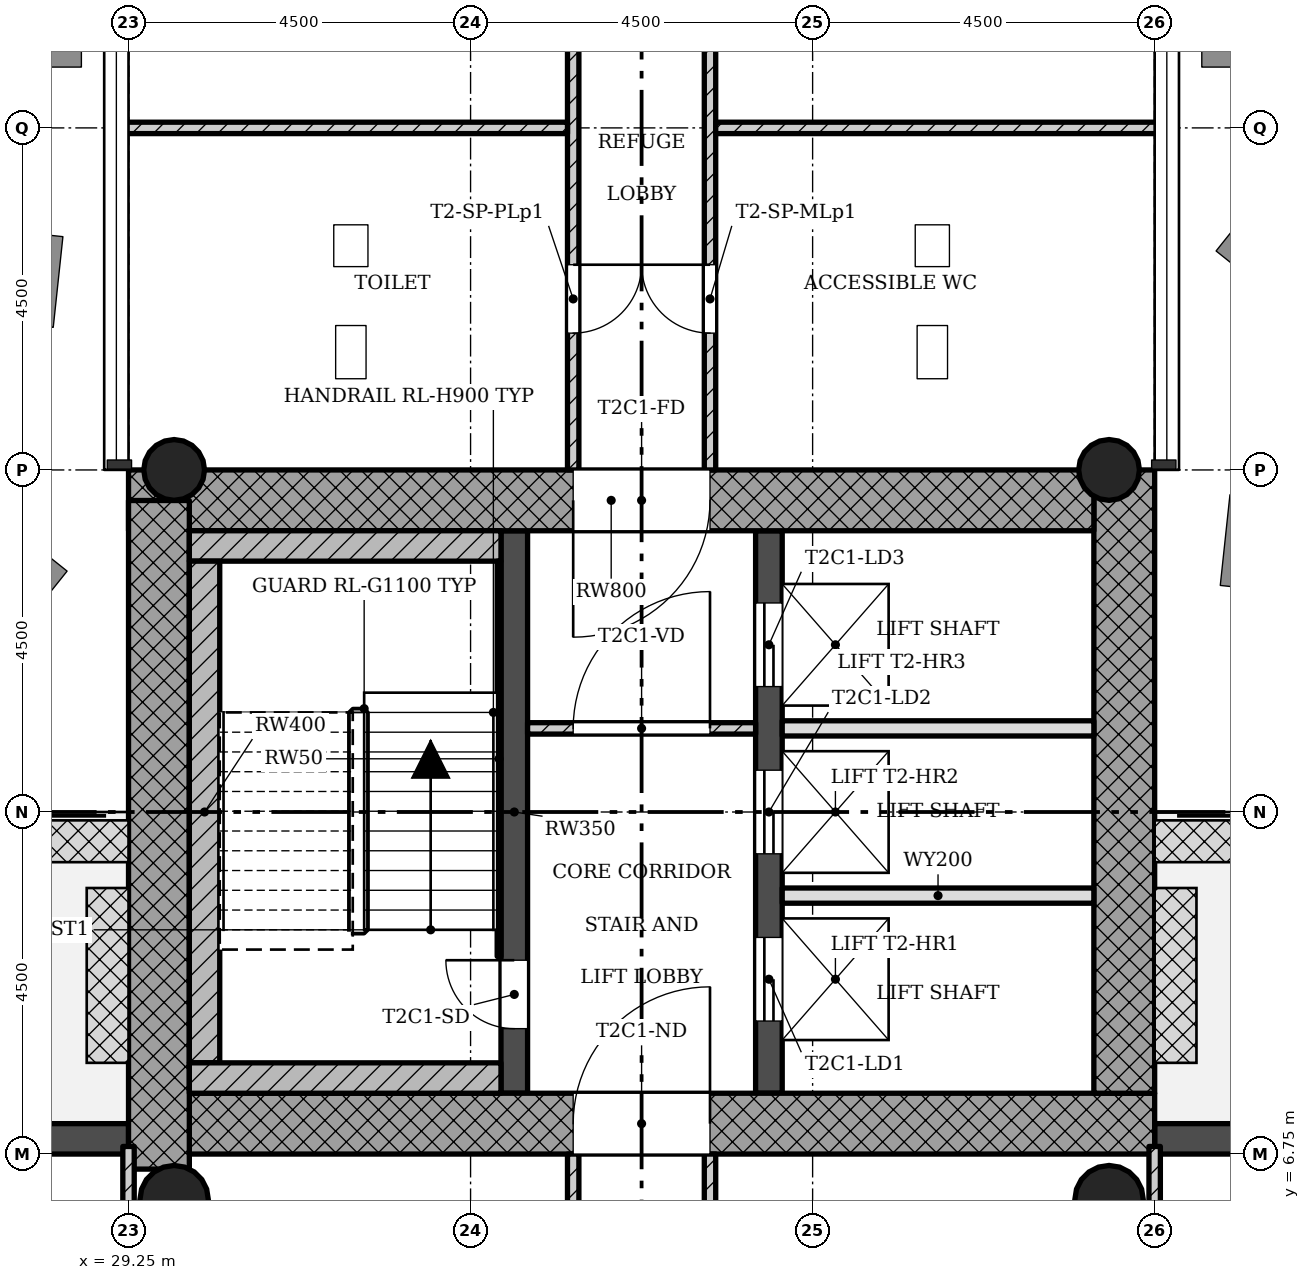
"""IFC4 building model, lengths in metres.
Left out: names, types, materials, properties, quantities, classifications, styles, units other than length and angle.
Written with IfcOpenShell. Run it as: python <this file> out.ifc"""

import sys

from ifc_helpers import new_model, si_unit, direction, frame, frame_2d, origin, origin_2d, place, context, subcontext, project, spatial, rectangle, hollow_circle, extrude, element, fill, save


model = new_model("IFC4")
c1 = context("Model", 3, precision=1e-05, world=origin(), true_north=direction((0.0, 1.0)))
c2 = subcontext(c1, "Body", "Model", "MODEL_VIEW")
j1 = project(units=[si_unit("LENGTHUNIT", "METRE"), si_unit("PLANEANGLEUNIT", "RADIAN")], contexts=[c1])
p1 = place(None, origin())
s1 = spatial("IfcSite", under=j1, at=p1, CompositionType="ELEMENT")
p2 = place(p1, origin())
s2 = spatial("IfcBuilding", under=s1, at=p2, CompositionType="ELEMENT")
p3 = place(p2, frame((0.0, 0.0, 181.3)))
s3 = spatial("IfcBuildingStorey", under=s2, at=p3, CompositionType="ELEMENT", Elevation=181.3)
p4 = place(p3, frame((30.05, 7.15, 0.0), z_axis=(0.0, 0.0, 1.0), x_axis=(1.0, 0.0, 0.0)))
e1 = element("IfcWall", 1, at=p4, inside=s3, PredefinedType="SHEAR", context=c2, shape_type="SweptSolid", body=[
    extrude(rectangle(XDim=12.7, YDim=0.8, at=frame_2d((6.35, 0.0))), origin(), (0.0, 0.0, 1.0), 4.5),
])
p5 = place(p4, frame((5.05, 0.0, 0.0)))
e2 = element("IfcOpeningElement", 2, at=p5, cuts=e1, PredefinedType="OPENING", context=c2, shape_type="SweptSolid", body=[
    extrude(rectangle(XDim=1.8, YDim=2.1, at=frame_2d((0.9, 1.05))), frame((0.0, 0.41, 0.0), z_axis=(0.0, -1.0, 0.0), x_axis=(1.0, 0.0, 0.0)), (0.0, 0.0, 1.0), 0.82),
])
p6 = place(p3, frame((42.35, 7.55, 0.0), z_axis=(0.0, 0.0, 1.0), x_axis=(0.0, 1.0, 0.0)))
e3 = element("IfcWall", 3, at=p6, inside=s3, PredefinedType="SHEAR", context=c2, shape_type="SweptSolid", body=[
    extrude(rectangle(XDim=8.2, YDim=0.8, at=frame_2d((4.1, 0.0))), origin(), (0.0, 0.0, 1.0), 4.5),
])
p7 = place(p3, frame((41.95, 15.35, 0.0), z_axis=(0.0, 0.0, 1.0), x_axis=(-1.0, 0.0, 0.0)))
e4 = element("IfcWall", 4, at=p7, inside=s3, PredefinedType="SHEAR", context=c2, shape_type="SweptSolid", body=[
    extrude(rectangle(XDim=12.7, YDim=0.8, at=frame_2d((6.35, 0.0))), origin(), (0.0, 0.0, 1.0), 4.5),
])
p8 = place(p7, frame((5.05, 0.0, 0.0)))
e5 = element("IfcOpeningElement", 5, at=p8, cuts=e4, PredefinedType="OPENING", context=c2, shape_type="SweptSolid", body=[
    extrude(rectangle(XDim=1.8, YDim=2.1, at=frame_2d((0.9, 1.05))), frame((0.0, 0.41, 0.0), z_axis=(0.0, -1.0, 0.0), x_axis=(1.0, 0.0, 0.0)), (0.0, 0.0, 1.0), 0.82),
])
p9 = place(p3, frame((29.65, 15.348, 0.0), z_axis=(0.0, 0.0, 1.0), x_axis=(0.0, -1.0, 0.0)))
e6 = element("IfcWall", 6, at=p9, inside=s3, PredefinedType="SHEAR", context=c2, shape_type="SweptSolid", body=[
    extrude(rectangle(XDim=8.796, YDim=0.8, at=frame_2d((4.398, 0.0))), origin(), (0.0, 0.0, 1.0), 4.5),
])
p10 = place(p3, frame((34.325, 7.55, 0.0), z_axis=(0.0, 0.0, 1.0), x_axis=(0.0, 1.0, 0.0)))
e7 = element("IfcWall", 7, at=p10, inside=s3, PredefinedType="SHEAR", context=c2, shape_type="SweptSolid", body=[
    extrude(rectangle(XDim=7.4, YDim=0.35, at=frame_2d((3.7, 0.0))), origin(), (0.0, 0.0, 1.0), 4.5),
])
p11 = place(p10, frame((0.85, 0.0, 0.0)))
e8 = element("IfcOpeningElement", 8, at=p11, cuts=e7, PredefinedType="OPENING", context=c2, shape_type="SweptSolid", body=[
    extrude(rectangle(XDim=0.9, YDim=2.1, at=frame_2d((0.45, 1.05))), frame((0.0, 0.185, 0.0), z_axis=(0.0, -1.0, 0.0), x_axis=(1.0, 0.0, 0.0)), (0.0, 0.0, 1.0), 0.37),
])
p12 = place(p3, frame((37.675, 7.55, 0.0), z_axis=(0.0, 0.0, 1.0), x_axis=(0.0, 1.0, 0.0)))
e9 = element("IfcWall", 9, at=p12, inside=s3, PredefinedType="SHEAR", context=c2, shape_type="SweptSolid", body=[
    extrude(rectangle(XDim=7.4, YDim=0.35, at=frame_2d((3.7, 0.0))), origin(), (0.0, 0.0, 1.0), 4.5),
])
p13 = place(p12, frame((0.95, 0.0, 0.0)))
e10 = element("IfcOpeningElement", 10, at=p13, cuts=e9, PredefinedType="OPENING", context=c2, shape_type="SweptSolid", body=[
    extrude(rectangle(XDim=1.1, YDim=2.1, at=frame_2d((0.55, 1.05))), frame((0.0, 0.185, 0.0), z_axis=(0.0, -1.0, 0.0), x_axis=(1.0, 0.0, 0.0)), (0.0, 0.0, 1.0), 0.37),
])
p14 = place(p12, frame((3.15, 0.0, 0.0)))
e11 = element("IfcOpeningElement", 11, at=p14, cuts=e9, PredefinedType="OPENING", context=c2, shape_type="SweptSolid", body=[
    extrude(rectangle(XDim=1.1, YDim=2.1, at=frame_2d((0.55, 1.05))), frame((0.0, 0.185, 0.0), z_axis=(0.0, -1.0, 0.0), x_axis=(1.0, 0.0, 0.0)), (0.0, 0.0, 1.0), 0.37),
])
p15 = place(p12, frame((5.35, 0.0, 0.0)))
e12 = element("IfcOpeningElement", 12, at=p15, cuts=e9, PredefinedType="OPENING", context=c2, shape_type="SweptSolid", body=[
    extrude(rectangle(XDim=1.1, YDim=2.1, at=frame_2d((0.55, 1.05))), frame((0.0, 0.185, 0.0), z_axis=(0.0, -1.0, 0.0), x_axis=(1.0, 0.0, 0.0)), (0.0, 0.0, 1.0), 0.37),
])
for number, where, z_axis, x_axis in (
    (13, (42.15, 15.75, 0.0), (0.0, 0.0, 1.0), (1.0, 0.0, 0.0)),
    (14, (29.85, 15.75, 0.0), (0.0, 0.0, 1.0), (1.0, 0.0, 0.0)),
):
    element("IfcColumn", number, at=place(p3, frame(where, z_axis=z_axis, x_axis=x_axis)), inside=s3, PredefinedType="COLUMN", context=c2, shape_type="SweptSolid", body=[
        extrude(hollow_circle(Radius=0.4, WallThickness=0.028, at=origin_2d()), origin(), (0.0, 0.0, 1.0), 4.5),
    ])
for number, where, z_axis, x_axis in (
    (15, (42.15, 6.15, 0.0), (0.0, 0.0, 1.0), (1.0, 0.0, 0.0)),
    (16, (29.85, 6.15, 0.0), (0.0, 0.0, 1.0), (1.0, 0.0, 0.0)),
):
    element("IfcColumn", number, at=place(p3, frame(where, z_axis=z_axis, x_axis=x_axis)), inside=s3, PredefinedType="COLUMN", context=c2, shape_type="SweptSolid", body=[
        extrude(hollow_circle(Radius=0.45, WallThickness=0.032, at=origin_2d()), origin(), (0.0, 0.0, 1.0), 4.5),
    ])
p16 = place(p3, frame((47.25, 6.95, -0.02), z_axis=(0.0, 0.0, 1.0), x_axis=(-1.0, 0.0, 0.0)))
e17 = element("IfcWall", 17, at=p16, inside=s3, PredefinedType="STANDARD", context=c2, shape_type="SweptSolid", body=[
    extrude(rectangle(XDim=4.5, YDim=0.4, at=frame_2d((2.25, 0.0))), origin(), (0.0, 0.0, 1.0), 4.22),
])
p17 = place(p16, frame((1.35, 0.0, 0.02)))
e18 = element("IfcOpeningElement", 18, at=p17, cuts=e17, PredefinedType="OPENING", context=c2, shape_type="SweptSolid", body=[
    extrude(rectangle(XDim=1.8, YDim=2.1, at=frame_2d((0.9, 1.05))), frame((0.0, 0.21, 0.0), z_axis=(0.0, -1.0, 0.0), x_axis=(1.0, 0.0, 0.0)), (0.0, 0.0, 1.0), 0.42),
])
p18 = place(p3, frame((29.25, 6.95, -0.02), z_axis=(0.0, 0.0, 1.0), x_axis=(-1.0, 0.0, 0.0)))
e19 = element("IfcWall", 19, at=p18, inside=s3, PredefinedType="STANDARD", context=c2, shape_type="SweptSolid", body=[
    extrude(rectangle(XDim=4.5, YDim=0.4, at=frame_2d((2.25, 0.0))), origin(), (0.0, 0.0, 1.0), 4.22),
])
p19 = place(p18, frame((1.35, 0.0, 0.02)))
e20 = element("IfcOpeningElement", 20, at=p19, cuts=e19, PredefinedType="OPENING", context=c2, shape_type="SweptSolid", body=[
    extrude(rectangle(XDim=1.8, YDim=2.1, at=frame_2d((0.9, 1.05))), frame((0.0, 0.21, 0.0), z_axis=(0.0, -1.0, 0.0), x_axis=(1.0, 0.0, 0.0)), (0.0, 0.0, 1.0), 0.42),
])
p20 = place(p3, frame((37.5, 12.35, 0.0), z_axis=(0.0, 0.0, 1.0), x_axis=(-1.0, 0.0, 0.0)))
e21 = element("IfcWall", 21, at=p20, inside=s3, PredefinedType="PARTITIONING", context=c2, shape_type="SweptSolid", body=[
    extrude(rectangle(XDim=3.0, YDim=0.15, at=frame_2d((1.5, 0.0))), origin(), (0.0, 0.0, 1.0), 4.08),
])
p21 = place(p20, frame((0.6, 0.0, 0.0)))
e22 = element("IfcOpeningElement", 22, at=p21, cuts=e21, PredefinedType="OPENING", context=c2, shape_type="SweptSolid", body=[
    extrude(rectangle(XDim=1.8, YDim=2.1, at=frame_2d((0.9, 1.05))), frame((0.0, 0.085, 0.0), z_axis=(0.0, -1.0, 0.0), x_axis=(1.0, 0.0, 0.0)), (0.0, 0.0, 1.0), 0.17),
])
for number, where, z_axis, x_axis in (
    (23, (41.95, 10.15, 0.0), (0.0, 0.0, 1.0), (-1.0, 0.0, 0.0)),
    (24, (41.95, 12.35, 0.0), (0.0, 0.0, 1.0), (-1.0, 0.0, 0.0)),
):
    element("IfcWall", number, at=place(p3, frame(where, z_axis=z_axis, x_axis=x_axis)), inside=s3, PredefinedType="SOLIDWALL", context=c2, shape_type="SweptSolid", body=[
        extrude(rectangle(XDim=4.1, YDim=0.2, at=frame_2d((2.05, 0.0))), origin(), (0.0, 0.0, 1.0), 4.08),
    ])
p22 = place(p3, frame((35.1, 0.9, 0.0), z_axis=(0.0, 0.0, 1.0), x_axis=(0.0, 1.0, 0.0)))
e25 = element("IfcWall", 25, at=p22, inside=s3, PredefinedType="PARTITIONING", context=c2, shape_type="SweptSolid", body=[
    extrude(rectangle(XDim=5.85, YDim=0.15, at=frame_2d((2.925, 0.0))), origin(), (0.0, 0.0, 1.0), 4.08),
])
p23 = place(p22, frame((2.475, 0.0, 0.0)))
e26 = element("IfcOpeningElement", 26, at=p23, cuts=e25, PredefinedType="OPENING", context=c2, shape_type="SweptSolid", body=[
    extrude(rectangle(XDim=0.9, YDim=2.1, at=frame_2d((0.45, 1.05))), frame((0.0, 0.085, 0.0), z_axis=(0.0, -1.0, 0.0), x_axis=(1.0, 0.0, 0.0)), (0.0, 0.0, 1.0), 0.17),
])
p24 = place(p3, frame((36.9, 0.9, 0.0), z_axis=(0.0, 0.0, 1.0), x_axis=(0.0, 1.0, 0.0)))
e27 = element("IfcWall", 27, at=p24, inside=s3, PredefinedType="PARTITIONING", context=c2, shape_type="SweptSolid", body=[
    extrude(rectangle(XDim=5.85, YDim=0.15, at=frame_2d((2.925, 0.0))), origin(), (0.0, 0.0, 1.0), 4.08),
])
p25 = place(p24, frame((2.475, 0.0, 0.0)))
e28 = element("IfcOpeningElement", 28, at=p25, cuts=e27, PredefinedType="OPENING", context=c2, shape_type="SweptSolid", body=[
    extrude(rectangle(XDim=0.9, YDim=2.1, at=frame_2d((0.45, 1.05))), frame((0.0, 0.085, 0.0), z_axis=(0.0, -1.0, 0.0), x_axis=(1.0, 0.0, 0.0)), (0.0, 0.0, 1.0), 0.17),
])
p26 = place(p3, frame((35.1, 15.75, 0.0), z_axis=(0.0, 0.0, 1.0), x_axis=(0.0, 1.0, 0.0)))
e29 = element("IfcWall", 29, at=p26, inside=s3, PredefinedType="PARTITIONING", context=c2, shape_type="SweptSolid", body=[
    extrude(rectangle(XDim=9.1, YDim=0.15, at=frame_2d((4.55, 0.0))), origin(), (0.0, 0.0, 1.0), 4.08),
])
p27 = place(p26, frame((1.8, 0.0, 0.0)))
e30 = element("IfcOpeningElement", 30, at=p27, cuts=e29, PredefinedType="OPENING", context=c2, shape_type="SweptSolid", body=[
    extrude(rectangle(XDim=0.9, YDim=2.1, at=frame_2d((0.45, 1.05))), frame((0.0, 0.085, 0.0), z_axis=(0.0, -1.0, 0.0), x_axis=(1.0, 0.0, 0.0)), (0.0, 0.0, 1.0), 0.17),
])
p28 = place(p26, frame((6.3, 0.0, 0.0)))
e31 = element("IfcOpeningElement", 31, at=p28, cuts=e29, PredefinedType="OPENING", context=c2, shape_type="SweptSolid", body=[
    extrude(rectangle(XDim=0.9, YDim=2.1, at=frame_2d((0.45, 1.05))), frame((0.0, 0.085, 0.0), z_axis=(0.0, -1.0, 0.0), x_axis=(1.0, 0.0, 0.0)), (0.0, 0.0, 1.0), 0.17),
])
p29 = place(p3, frame((35.025, 20.25, 0.0), z_axis=(0.0, 0.0, 1.0), x_axis=(-1.0, 0.0, 0.0)))
e32 = element("IfcWall", 32, at=p29, inside=s3, PredefinedType="PARTITIONING", context=c2, shape_type="SweptSolid", body=[
    extrude(rectangle(XDim=5.875, YDim=0.15, at=frame_2d((2.938, 0.0))), origin(), (0.0, 0.0, 1.0), 4.08),
])
p30 = place(p3, frame((36.9, 15.75, 0.0), z_axis=(0.0, 0.0, 1.0), x_axis=(0.0, 1.0, 0.0)))
e33 = element("IfcWall", 33, at=p30, inside=s3, PredefinedType="PARTITIONING", context=c2, shape_type="SweptSolid", body=[
    extrude(rectangle(XDim=9.1, YDim=0.15, at=frame_2d((4.55, 0.0))), origin(), (0.0, 0.0, 1.0), 4.08),
])
p31 = place(p30, frame((1.8, 0.0, 0.0)))
e34 = element("IfcOpeningElement", 34, at=p31, cuts=e33, PredefinedType="OPENING", context=c2, shape_type="SweptSolid", body=[
    extrude(rectangle(XDim=0.9, YDim=2.1, at=frame_2d((0.45, 1.05))), frame((0.0, 0.085, 0.0), z_axis=(0.0, -1.0, 0.0), x_axis=(1.0, 0.0, 0.0)), (0.0, 0.0, 1.0), 0.17),
])
p32 = place(p30, frame((6.3, 0.0, 0.0)))
e35 = element("IfcOpeningElement", 35, at=p32, cuts=e33, PredefinedType="OPENING", context=c2, shape_type="SweptSolid", body=[
    extrude(rectangle(XDim=0.9, YDim=2.1, at=frame_2d((0.45, 1.05))), frame((0.0, 0.085, 0.0), z_axis=(0.0, -1.0, 0.0), x_axis=(1.0, 0.0, 0.0)), (0.0, 0.0, 1.0), 0.17),
])
p33 = place(p3, frame((36.975, 20.25, 0.0), z_axis=(0.0, 0.0, 1.0), x_axis=(1.0, 0.0, 0.0)))
e36 = element("IfcWall", 36, at=p33, inside=s3, PredefinedType="PARTITIONING", context=c2, shape_type="SweptSolid", body=[
    extrude(rectangle(XDim=5.875, YDim=0.15, at=frame_2d((2.938, 0.0))), origin(), (0.0, 0.0, 1.0), 4.08),
])
p34 = place(p3, frame((29.25, -6.85, 0.0), z_axis=(0.0, 0.0, 1.0), x_axis=(0.0, 1.0, 0.0)))
e37 = element("IfcWall", 37, at=p34, inside=s3, PredefinedType="PARTITIONING", context=c2, shape_type="SweptSolid", body=[
    extrude(rectangle(XDim=13.7, YDim=0.15, at=frame_2d((6.85, 0.0))), origin(), (0.0, 0.0, 1.0), 4.08),
])
p35 = place(p34, frame((5.95, 0.0, 0.0)))
e38 = element("IfcOpeningElement", 38, at=p35, cuts=e37, PredefinedType="OPENING", context=c2, shape_type="SweptSolid", body=[
    extrude(rectangle(XDim=1.8, YDim=2.1, at=frame_2d((0.9, 1.05))), frame((0.0, 0.085, 0.0), z_axis=(0.0, -1.0, 0.0), x_axis=(1.0, 0.0, 0.0)), (0.0, 0.0, 1.0), 0.17),
])
p36 = place(p3, frame((42.75, -6.85, 0.0), z_axis=(0.0, 0.0, 1.0), x_axis=(0.0, 1.0, 0.0)))
e39 = element("IfcWall", 39, at=p36, inside=s3, PredefinedType="PARTITIONING", context=c2, shape_type="SweptSolid", body=[
    extrude(rectangle(XDim=13.7, YDim=0.15, at=frame_2d((6.85, 0.0))), origin(), (0.0, 0.0, 1.0), 4.08),
])
p37 = place(p36, frame((5.95, 0.0, 0.0)))
e40 = element("IfcOpeningElement", 40, at=p37, cuts=e39, PredefinedType="OPENING", context=c2, shape_type="SweptSolid", body=[
    extrude(rectangle(XDim=1.8, YDim=2.1, at=frame_2d((0.9, 1.05))), frame((0.0, 0.085, 0.0), z_axis=(0.0, -1.0, 0.0), x_axis=(1.0, 0.0, 0.0)), (0.0, 0.0, 1.0), 0.17),
])
p38 = place(p3, frame((34.15, 14.75, 0.0), z_axis=(0.0, 0.0, 1.0), x_axis=(-1.0, 0.0, 0.0)))
e41 = element("IfcWall", 41, at=p38, inside=s3, PredefinedType="SHEAR", context=c2, shape_type="SweptSolid", body=[
    extrude(rectangle(XDim=4.1, YDim=0.4, at=frame_2d((2.05, 0.0))), origin(), (0.0, 0.0, 1.0), 4.5),
])
p39 = place(p3, frame((30.25, 7.95, 0.0), z_axis=(0.0, 0.0, 1.0), x_axis=(0.0, 1.0, 0.0)))
e42 = element("IfcWall", 42, at=p39, inside=s3, PredefinedType="SHEAR", context=c2, shape_type="SweptSolid", body=[
    extrude(rectangle(XDim=6.6, YDim=0.4, at=frame_2d((3.3, 0.0))), origin(), (0.0, 0.0, 1.0), 4.5),
])
p40 = place(p3, frame((34.15, 7.75, 0.0), z_axis=(0.0, 0.0, 1.0), x_axis=(-1.0, 0.0, 0.0)))
e43 = element("IfcWall", 43, at=p40, inside=s3, PredefinedType="SHEAR", context=c2, shape_type="SweptSolid", body=[
    extrude(rectangle(XDim=4.1, YDim=0.4, at=frame_2d((2.05, 0.0))), origin(), (0.0, 0.0, 1.0), 4.5),
])
p41 = place(p3, frame((34.125, 9.35, 0.0), z_axis=(0.0, 0.0, 1.0), x_axis=(0.0, 1.0, 0.0)))
e44 = element("IfcWall", 44, at=p41, inside=s3, PredefinedType="SHEAR", context=c2, shape_type="SweptSolid", body=[
    extrude(rectangle(XDim=5.2, YDim=0.05, at=frame_2d((2.6, 0.0))), origin(), (0.0, 0.0, 1.0), 4.5),
])
p42 = place(p21, origin())
e45 = element("IfcDoor", 45, at=p42, inside=s3, OperationType="SINGLE_SWING_LEFT", PredefinedType="DOOR", context=c2, shape_type="SweptSolid", body=[
    extrude(rectangle(XDim=1.8, YDim=2.1, at=frame_2d((0.9, 1.05))), frame((0.0, 0.025, 0.0), z_axis=(0.0, -1.0, 0.0), x_axis=(1.0, 0.0, 0.0)), (0.0, 0.0, 1.0), 0.05),
])
fill(e22, e45)
p43 = place(p27, origin())
e46 = element("IfcDoor", 46, at=p43, inside=s3, OperationType="SINGLE_SWING_RIGHT", PredefinedType="DOOR", context=c2, shape_type="SweptSolid", body=[
    extrude(rectangle(XDim=0.9, YDim=2.1, at=frame_2d((0.45, 1.05))), frame((0.0, 0.025, 0.0), z_axis=(0.0, -1.0, 0.0), x_axis=(1.0, 0.0, 0.0)), (0.0, 0.0, 1.0), 0.05),
])
fill(e30, e46)
p44 = place(p31, origin())
e47 = element("IfcDoor", 47, at=p44, inside=s3, OperationType="SINGLE_SWING_LEFT", PredefinedType="DOOR", context=c2, shape_type="SweptSolid", body=[
    extrude(rectangle(XDim=0.9, YDim=2.1, at=frame_2d((0.45, 1.05))), frame((0.0, 0.025, 0.0), z_axis=(0.0, -1.0, 0.0), x_axis=(1.0, 0.0, 0.0)), (0.0, 0.0, 1.0), 0.05),
])
fill(e34, e47)
p45 = place(p11, origin())
e48 = element("IfcDoor", 48, at=p45, inside=s3, OperationType="SINGLE_SWING_LEFT", PredefinedType="DOOR", context=c2, shape_type="SweptSolid", body=[
    extrude(rectangle(XDim=0.9, YDim=2.1, at=frame_2d((0.45, 1.05))), frame((0.0, 0.025, 0.0), z_axis=(0.0, -1.0, 0.0), x_axis=(1.0, 0.0, 0.0)), (0.0, 0.0, 1.0), 0.05),
])
fill(e8, e48)
p46 = place(p13, origin())
e49 = element("IfcDoor", 49, at=p46, inside=s3, OperationType="SLIDING_TO_LEFT", PredefinedType="DOOR", context=c2, shape_type="SweptSolid", body=[
    extrude(rectangle(XDim=1.1, YDim=2.1, at=frame_2d((0.55, 1.05))), frame((0.0, 0.025, 0.0), z_axis=(0.0, -1.0, 0.0), x_axis=(1.0, 0.0, 0.0)), (0.0, 0.0, 1.0), 0.05),
])
fill(e10, e49)
p47 = place(p14, origin())
e50 = element("IfcDoor", 50, at=p47, inside=s3, OperationType="SLIDING_TO_LEFT", PredefinedType="DOOR", context=c2, shape_type="SweptSolid", body=[
    extrude(rectangle(XDim=1.1, YDim=2.1, at=frame_2d((0.55, 1.05))), frame((0.0, 0.025, 0.0), z_axis=(0.0, -1.0, 0.0), x_axis=(1.0, 0.0, 0.0)), (0.0, 0.0, 1.0), 0.05),
])
fill(e11, e50)
p48 = place(p15, origin())
e51 = element("IfcDoor", 51, at=p48, inside=s3, OperationType="SLIDING_TO_LEFT", PredefinedType="DOOR", context=c2, shape_type="SweptSolid", body=[
    extrude(rectangle(XDim=1.1, YDim=2.1, at=frame_2d((0.55, 1.05))), frame((0.0, 0.025, 0.0), z_axis=(0.0, -1.0, 0.0), x_axis=(1.0, 0.0, 0.0)), (0.0, 0.0, 1.0), 0.05),
])
fill(e12, e51)
p49 = place(p5, origin())
e52 = element("IfcDoor", 52, at=p49, inside=s3, OperationType="SINGLE_SWING_LEFT", PredefinedType="DOOR", context=c2, shape_type="SweptSolid", body=[
    extrude(rectangle(XDim=1.8, YDim=2.1, at=frame_2d((0.9, 1.05))), frame((0.0, 0.025, 0.0), z_axis=(0.0, -1.0, 0.0), x_axis=(1.0, 0.0, 0.0)), (0.0, 0.0, 1.0), 0.05),
])
fill(e2, e52)
p50 = place(p8, origin())
e53 = element("IfcDoor", 53, at=p50, inside=s3, OperationType="SINGLE_SWING_LEFT", PredefinedType="DOOR", context=c2, shape_type="SweptSolid", body=[
    extrude(rectangle(XDim=1.8, YDim=2.1, at=frame_2d((0.9, 1.05))), frame((0.0, 0.025, 0.0), z_axis=(0.0, -1.0, 0.0), x_axis=(1.0, 0.0, 0.0)), (0.0, 0.0, 1.0), 0.05),
])
fill(e5, e53)
save(model, sys.argv[1])
